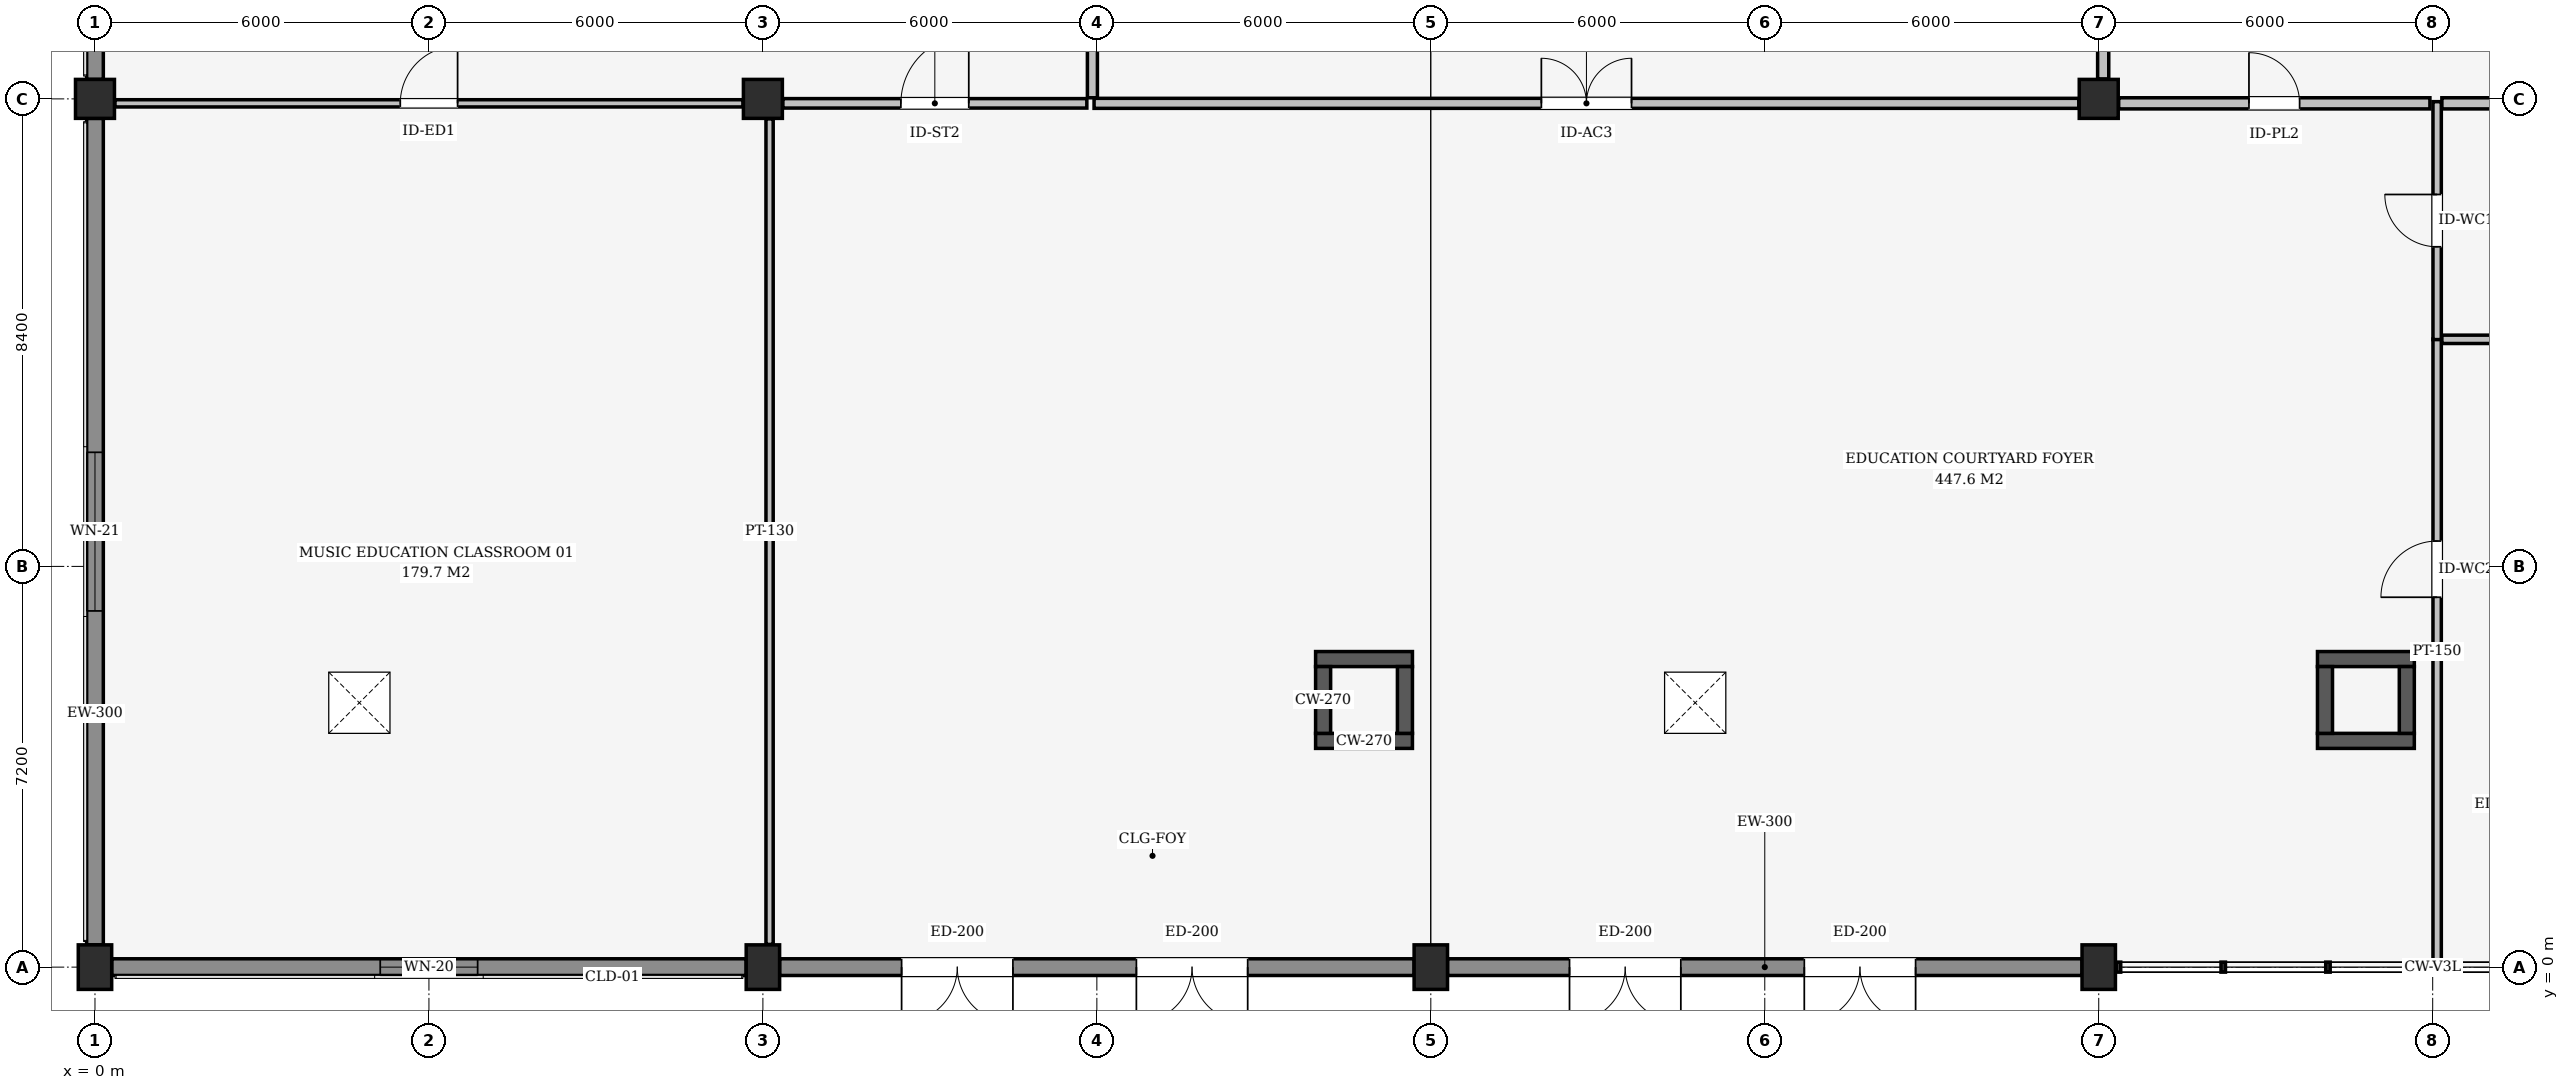
"""IFC4 building model, lengths in metres.
Left out: names, types, materials, properties, quantities, classifications, styles, units other than length and angle.
Written with IfcOpenShell. Run it as: python <this file> out.ifc"""

import sys

from ifc_helpers import new_model, si_unit, direction, frame, frame_2d, origin, origin_2d, place, context, subcontext, project, spatial, rectangle, extrude, element, fill, save


model = new_model("IFC4")
c1 = context("Model", 3, precision=1e-05, world=origin(), true_north=direction((0.0, 1.0)))
c2 = subcontext(c1, "Body", "Model", "MODEL_VIEW")
j1 = project(units=[si_unit("LENGTHUNIT", "METRE"), si_unit("PLANEANGLEUNIT", "RADIAN")], contexts=[c1])
p1 = place(None, origin())
s1 = spatial("IfcSite", under=j1, at=p1, CompositionType="ELEMENT")
p2 = place(p1, origin())
s2 = spatial("IfcBuilding", under=s1, at=p2, CompositionType="ELEMENT")
p3 = place(p2, origin())
s3 = spatial("IfcBuildingStorey", under=s2, at=p3, CompositionType="ELEMENT", Elevation=0.0)
for number, where, z_axis, x_axis in (
    (1, (0.0, 0.0, 0.0), (0.0, 0.0, 1.0), (1.0, 0.0, 0.0)),
    (2, (12.0, 0.0, 0.0), (0.0, 0.0, 1.0), (1.0, 0.0, 0.0)),
    (3, (24.0, 0.0, 0.0), (0.0, 0.0, 1.0), (1.0, 0.0, 0.0)),
    (4, (36.0, 0.0, 0.0), (0.0, 0.0, 1.0), (1.0, 0.0, 0.0)),
):
    element("IfcColumn", number, at=place(p3, frame(where, z_axis=z_axis, x_axis=x_axis)), inside=s3, PredefinedType="COLUMN", context=c2, shape_type="SweptSolid", body=[
        extrude(rectangle(XDim=0.6, YDim=0.8, at=origin_2d()), origin(), (0.0, 0.0, 1.0), 4.8),
    ])
for number, where, z_axis, x_axis in (
    (5, (0.0, 15.6, 0.0), (0.0, 0.0, 1.0), (1.0, 0.0, 0.0)),
    (6, (12.0, 15.6, 0.0), (0.0, 0.0, 1.0), (1.0, 0.0, 0.0)),
    (7, (36.0, 15.6, 0.0), (0.0, 0.0, 1.0), (1.0, 0.0, 0.0)),
):
    element("IfcColumn", number, at=place(p3, frame(where, z_axis=z_axis, x_axis=x_axis)), inside=s3, PredefinedType="COLUMN", context=c2, shape_type="SweptSolid", body=[
        extrude(rectangle(XDim=0.7, YDim=0.7, at=origin_2d()), origin(), (0.0, 0.0, 1.0), 4.8),
    ])
p4 = place(p3, frame((11.7, 0.0, 0.0), z_axis=(0.0, 0.0, 1.0), x_axis=(-1.0, 0.0, 0.0)))
e8 = element("IfcWall", 8, at=p4, inside=s3, PredefinedType="SOLIDWALL", context=c2, shape_type="SweptSolid", body=[
    extrude(rectangle(XDim=11.4, YDim=0.3, at=frame_2d((5.7, 0.0))), origin(), (0.0, 0.0, 1.0), 3.64),
])
p5 = place(p4, frame((4.825, 0.0, 0.85)))
e9 = element("IfcOpeningElement", 9, at=p5, cuts=e8, PredefinedType="OPENING", context=c2, shape_type="SweptSolid", body=[
    extrude(rectangle(XDim=1.75, YDim=1.45, at=frame_2d((0.875, 0.725))), frame((0.0, 0.16, 0.0), z_axis=(0.0, -1.0, 0.0), x_axis=(1.0, 0.0, 0.0)), (0.0, 0.0, 1.0), 0.32),
])
p6 = place(p3, frame((23.7, 0.0, 0.0), z_axis=(0.0, 0.0, 1.0), x_axis=(-1.0, 0.0, 0.0)))
e10 = element("IfcWall", 10, at=p6, inside=s3, PredefinedType="SOLIDWALL", context=c2, shape_type="SweptSolid", body=[
    extrude(rectangle(XDim=11.4, YDim=0.3, at=frame_2d((5.7, 0.0))), origin(), (0.0, 0.0, 1.0), 3.64),
])
p7 = place(p6, frame((2.99, 0.0, 0.0)))
e11 = element("IfcOpeningElement", 11, at=p7, cuts=e10, PredefinedType="OPENING", context=c2, shape_type="SweptSolid", body=[
    extrude(rectangle(XDim=2.0, YDim=2.4, at=frame_2d((1.0, 1.2))), frame((0.0, 0.16, 0.0), z_axis=(0.0, -1.0, 0.0), x_axis=(1.0, 0.0, 0.0)), (0.0, 0.0, 1.0), 0.32),
])
p8 = place(p6, frame((7.208, 0.0, 0.0)))
e12 = element("IfcOpeningElement", 12, at=p8, cuts=e10, PredefinedType="OPENING", context=c2, shape_type="SweptSolid", body=[
    extrude(rectangle(XDim=2.0, YDim=2.4, at=frame_2d((1.0, 1.2))), frame((0.0, 0.16, 0.0), z_axis=(0.0, -1.0, 0.0), x_axis=(1.0, 0.0, 0.0)), (0.0, 0.0, 1.0), 0.32),
])
p9 = place(p3, frame((35.7, 0.0, 0.0), z_axis=(0.0, 0.0, 1.0), x_axis=(-1.0, 0.0, 0.0)))
e13 = element("IfcWall", 13, at=p9, inside=s3, PredefinedType="SOLIDWALL", context=c2, shape_type="SweptSolid", body=[
    extrude(rectangle(XDim=11.4, YDim=0.3, at=frame_2d((5.7, 0.0))), origin(), (0.0, 0.0, 1.0), 3.64),
])
p10 = place(p9, frame((2.99, 0.0, 0.0)))
e14 = element("IfcOpeningElement", 14, at=p10, cuts=e13, PredefinedType="OPENING", context=c2, shape_type="SweptSolid", body=[
    extrude(rectangle(XDim=2.0, YDim=2.4, at=frame_2d((1.0, 1.2))), frame((0.0, 0.16, 0.0), z_axis=(0.0, -1.0, 0.0), x_axis=(1.0, 0.0, 0.0)), (0.0, 0.0, 1.0), 0.32),
])
p11 = place(p9, frame((7.208, 0.0, 0.0)))
e15 = element("IfcOpeningElement", 15, at=p11, cuts=e13, PredefinedType="OPENING", context=c2, shape_type="SweptSolid", body=[
    extrude(rectangle(XDim=2.0, YDim=2.4, at=frame_2d((1.0, 1.2))), frame((0.0, 0.16, 0.0), z_axis=(0.0, -1.0, 0.0), x_axis=(1.0, 0.0, 0.0)), (0.0, 0.0, 1.0), 0.32),
])
p12 = place(p3, frame((0.0, 0.4, 0.0), z_axis=(0.0, 0.0, 1.0), x_axis=(0.0, 1.0, 0.0)))
e16 = element("IfcWall", 16, at=p12, inside=s3, PredefinedType="SOLIDWALL", context=c2, shape_type="SweptSolid", body=[
    extrude(rectangle(XDim=14.85, YDim=0.3, at=frame_2d((7.425, 0.0))), origin(), (0.0, 0.0, 1.0), 3.684),
])
p13 = place(p12, frame((6.0, 0.0, 0.6)))
e17 = element("IfcOpeningElement", 17, at=p13, cuts=e16, PredefinedType="OPENING", context=c2, shape_type="SweptSolid", body=[
    extrude(rectangle(XDim=2.85, YDim=2.0, at=frame_2d((1.425, 1.0))), frame((0.0, 0.16, 0.0), z_axis=(0.0, -1.0, 0.0), x_axis=(1.0, 0.0, 0.0)), (0.0, 0.0, 1.0), 0.32),
])
p14 = place(p3, frame((0.0, 15.95, 0.0), z_axis=(0.0, 0.0, 1.0), x_axis=(0.0, 1.0, 0.0)))
e18 = element("IfcWall", 18, at=p14, inside=s3, PredefinedType="SOLIDWALL", context=c2, shape_type="SweptSolid", body=[
    extrude(rectangle(XDim=13.7, YDim=0.3, at=frame_2d((6.85, 0.0))), origin(), (0.0, 0.0, 1.0), 3.919),
])
p15 = place(p14, frame((8.614, 0.0, 0.85)))
e19 = element("IfcOpeningElement", 19, at=p15, cuts=e18, PredefinedType="OPENING", context=c2, shape_type="SweptSolid", body=[
    extrude(rectangle(XDim=2.5, YDim=1.9, at=frame_2d((1.25, 0.95))), frame((0.0, 0.16, 0.0), z_axis=(0.0, -1.0, 0.0), x_axis=(1.0, 0.0, 0.0)), (0.0, 0.0, 1.0), 0.32),
])
for number, where, z_axis, x_axis in (
    (20, (21.93, 4.065, 0.0), (0.0, 0.0, 1.0), (1.0, 0.0, 0.0)),
    (21, (21.93, 5.535, 0.0), (0.0, 0.0, 1.0), (1.0, 0.0, 0.0)),
):
    element("IfcWall", number, at=place(p3, frame(where, z_axis=z_axis, x_axis=x_axis)), inside=s3, PredefinedType="SHEAR", context=c2, shape_type="SweptSolid", body=[
        extrude(rectangle(XDim=1.74, YDim=0.27, at=frame_2d((0.87, 0.0))), origin(), (0.0, 0.0, 1.0), 4.55),
    ])
for number, where, z_axis, x_axis in (
    (22, (22.065, 4.2, 0.0), (0.0, 0.0, 1.0), (0.0, 1.0, 0.0)),
    (23, (23.535, 4.2, 0.0), (0.0, 0.0, 1.0), (0.0, 1.0, 0.0)),
):
    element("IfcWall", number, at=place(p3, frame(where, z_axis=z_axis, x_axis=x_axis)), inside=s3, PredefinedType="SHEAR", context=c2, shape_type="SweptSolid", body=[
        extrude(rectangle(XDim=1.2, YDim=0.27, at=frame_2d((0.6, 0.0))), origin(), (0.0, 0.0, 1.0), 4.55),
    ])
for number, where, z_axis, x_axis in (
    (24, (39.93, 4.065, 0.0), (0.0, 0.0, 1.0), (1.0, 0.0, 0.0)),
    (25, (39.93, 5.535, 0.0), (0.0, 0.0, 1.0), (1.0, 0.0, 0.0)),
):
    element("IfcWall", number, at=place(p3, frame(where, z_axis=z_axis, x_axis=x_axis)), inside=s3, PredefinedType="SHEAR", context=c2, shape_type="SweptSolid", body=[
        extrude(rectangle(XDim=1.74, YDim=0.27, at=frame_2d((0.87, 0.0))), origin(), (0.0, 0.0, 1.0), 4.55),
    ])
for number, where, z_axis, x_axis in (
    (26, (40.065, 4.2, 0.0), (0.0, 0.0, 1.0), (0.0, 1.0, 0.0)),
    (27, (41.535, 4.2, 0.0), (0.0, 0.0, 1.0), (0.0, 1.0, 0.0)),
):
    element("IfcWall", number, at=place(p3, frame(where, z_axis=z_axis, x_axis=x_axis)), inside=s3, PredefinedType="SHEAR", context=c2, shape_type="SweptSolid", body=[
        extrude(rectangle(XDim=1.2, YDim=0.27, at=frame_2d((0.6, 0.0))), origin(), (0.0, 0.0, 1.0), 4.55),
    ])
p16 = place(p3, frame((17.95, 15.52, 0.0), z_axis=(0.0, 0.0, 1.0), x_axis=(1.0, 0.0, 0.0)))
e28 = element("IfcWall", 28, at=p16, inside=s3, PredefinedType="PARTITIONING", context=c2, shape_type="SweptSolid", body=[
    extrude(rectangle(XDim=17.692, YDim=0.18, at=frame_2d((8.846, 0.0))), origin(), (0.0, 0.0, 1.0), 3.23),
])
p17 = place(p16, frame((8.036, 0.0, 0.0)))
e29 = element("IfcOpeningElement", 29, at=p17, cuts=e28, PredefinedType="OPENING", context=c2, shape_type="SweptSolid", body=[
    extrude(rectangle(XDim=1.62, YDim=2.28, at=frame_2d((0.81, 1.14))), frame((0.0, 0.1, 0.0), z_axis=(0.0, -1.0, 0.0), x_axis=(1.0, 0.0, 0.0)), (0.0, 0.0, 1.0), 0.2),
])
p18 = place(p3, frame((17.92, 15.62, 0.0), z_axis=(0.0, 0.0, 1.0), x_axis=(0.0, 1.0, 0.0)))
e30 = element("IfcWall", 30, at=p18, inside=s3, PredefinedType="PARTITIONING", context=c2, shape_type="SweptSolid", body=[
    extrude(rectangle(XDim=14.465, YDim=0.18, at=frame_2d((7.232, 0.0))), origin(), (0.0, 0.0, 1.0), 4.068),
])
p19 = place(p18, frame((6.423, 0.0, 0.0)))
e31 = element("IfcOpeningElement", 31, at=p19, cuts=e30, PredefinedType="OPENING", context=c2, shape_type="SweptSolid", body=[
    extrude(rectangle(XDim=1.62, YDim=2.28, at=frame_2d((0.81, 1.14))), frame((0.0, 0.1, 0.0), z_axis=(0.0, -1.0, 0.0), x_axis=(1.0, 0.0, 0.0)), (0.0, 0.0, 1.0), 0.2),
])
p20 = place(p3, frame((36.08, 15.958, 0.0), z_axis=(0.0, 0.0, 1.0), x_axis=(0.0, 1.0, 0.0)))
e32 = element("IfcWall", 32, at=p20, inside=s3, PredefinedType="PARTITIONING", context=c2, shape_type="SweptSolid", body=[
    extrude(rectangle(XDim=13.684, YDim=0.2, at=frame_2d((6.842, 0.0))), origin(), (0.0, 0.0, 1.0), 3.919),
])
p21 = place(p3, frame((12.358, 15.52, 0.0), z_axis=(0.0, 0.0, 1.0), x_axis=(1.0, 0.0, 0.0)))
e33 = element("IfcWall", 33, at=p21, inside=s3, PredefinedType="PARTITIONING", context=c2, shape_type="SweptSolid", body=[
    extrude(rectangle(XDim=5.462, YDim=0.17, at=frame_2d((2.731, 0.0))), origin(), (0.0, 0.0, 1.0), 3.23),
])
p22 = place(p21, frame((2.121, 0.0, 0.0)))
e34 = element("IfcOpeningElement", 34, at=p22, cuts=e33, PredefinedType="OPENING", context=c2, shape_type="SweptSolid", body=[
    extrude(rectangle(XDim=1.22, YDim=2.18, at=frame_2d((0.61, 1.09))), frame((0.0, 0.095, 0.0), z_axis=(0.0, -1.0, 0.0), x_axis=(1.0, 0.0, 0.0)), (0.0, 0.0, 1.0), 0.19),
])
p23 = place(p3, frame((12.12, 0.408, 0.0), z_axis=(0.0, 0.0, 1.0), x_axis=(0.0, 1.0, 0.0)))
e35 = element("IfcWall", 35, at=p23, inside=s3, PredefinedType="PARTITIONING", context=c2, shape_type="SweptSolid", body=[
    extrude(rectangle(XDim=14.834, YDim=0.13, at=frame_2d((7.417, 0.0))), origin(), (0.0, 0.0, 1.0), 3.684),
])
p24 = place(p3, frame((42.08, 0.05, 0.0), z_axis=(0.0, 0.0, 1.0), x_axis=(0.0, 1.0, 0.0)))
e36 = element("IfcWall", 36, at=p24, inside=s3, PredefinedType="PARTITIONING", context=c2, shape_type="SweptSolid", body=[
    extrude(rectangle(XDim=11.235, YDim=0.15, at=frame_2d((5.617, 0.0))), origin(), (0.0, 0.0, 1.0), 3.986),
])
p25 = place(p24, frame((6.596, 0.0, 0.0)))
e37 = element("IfcOpeningElement", 37, at=p25, cuts=e36, PredefinedType="OPENING", context=c2, shape_type="SweptSolid", body=[
    extrude(rectangle(XDim=1.01, YDim=2.1, at=frame_2d((0.505, 1.05))), frame((0.0, 0.085, 0.0), z_axis=(0.0, -1.0, 0.0), x_axis=(1.0, 0.0, 0.0)), (0.0, 0.0, 1.0), 0.17),
])
p26 = place(p3, frame((42.08, 11.275, 0.0), z_axis=(0.0, 0.0, 1.0), x_axis=(0.0, 1.0, 0.0)))
e38 = element("IfcWall", 38, at=p26, inside=s3, PredefinedType="PARTITIONING", context=c2, shape_type="SweptSolid", body=[
    extrude(rectangle(XDim=4.275, YDim=0.15, at=frame_2d((2.138, 0.0))), origin(), (0.0, 0.0, 1.0), 3.986),
])
p27 = place(p26, frame((1.667, 0.0, 0.0)))
e39 = element("IfcOpeningElement", 39, at=p27, cuts=e38, PredefinedType="OPENING", context=c2, shape_type="SweptSolid", body=[
    extrude(rectangle(XDim=0.94, YDim=2.1, at=frame_2d((0.47, 1.05))), frame((0.0, 0.085, 0.0), z_axis=(0.0, -1.0, 0.0), x_axis=(1.0, 0.0, 0.0)), (0.0, 0.0, 1.0), 0.17),
])
p28 = place(p3, frame((36.358, 15.52, 0.0), z_axis=(0.0, 0.0, 1.0), x_axis=(1.0, 0.0, 0.0)))
e40 = element("IfcWall", 40, at=p28, inside=s3, PredefinedType="PARTITIONING", context=c2, shape_type="SweptSolid", body=[
    extrude(rectangle(XDim=5.592, YDim=0.2, at=frame_2d((2.796, 0.0))), origin(), (0.0, 0.0, 1.0), 3.73),
])
p29 = place(p28, frame((2.341, 0.0, 0.0)))
e41 = element("IfcOpeningElement", 41, at=p29, cuts=e40, PredefinedType="OPENING", context=c2, shape_type="SweptSolid", body=[
    extrude(rectangle(XDim=0.91, YDim=2.1, at=frame_2d((0.455, 1.05))), frame((0.0, 0.11, 0.0), z_axis=(0.0, -1.0, 0.0), x_axis=(1.0, 0.0, 0.0)), (0.0, 0.0, 1.0), 0.22),
])
p30 = place(p3, frame((0.358, 15.52, 0.0), z_axis=(0.0, 0.0, 1.0), x_axis=(1.0, 0.0, 0.0)))
e42 = element("IfcWall", 42, at=p30, inside=s3, PredefinedType="PARTITIONING", context=c2, shape_type="SweptSolid", body=[
    extrude(rectangle(XDim=11.284, YDim=0.13, at=frame_2d((5.642, 0.0))), origin(), (0.0, 0.0, 1.0), 3.73),
])
p31 = place(p30, frame((5.127, 0.0, 0.0)))
e43 = element("IfcOpeningElement", 43, at=p31, cuts=e42, PredefinedType="OPENING", context=c2, shape_type="SweptSolid", body=[
    extrude(rectangle(XDim=1.03, YDim=2.18, at=frame_2d((0.515, 1.09))), frame((0.0, 0.075, 0.0), z_axis=(0.0, -1.0, 0.0), x_axis=(1.0, 0.0, 0.0)), (0.0, 0.0, 1.0), 0.15),
])
p32 = place(p3, frame((42.165, 11.28, 0.0), z_axis=(0.0, 0.0, 1.0), x_axis=(1.0, 0.0, 0.0)))
e44 = element("IfcWall", 44, at=p32, inside=s3, PredefinedType="PARTITIONING", context=c2, shape_type="SweptSolid", body=[
    extrude(rectangle(XDim=5.785, YDim=0.15, at=frame_2d((2.893, 0.0))), origin(), (0.0, 0.0, 1.0), 4.53),
])
p33 = place(p3, frame((42.165, 15.52, 0.0), z_axis=(0.0, 0.0, 1.0), x_axis=(1.0, 0.0, 0.0)))
e45 = element("IfcWall", 45, at=p33, inside=s3, PredefinedType="PARTITIONING", context=c2, shape_type="SweptSolid", body=[
    extrude(rectangle(XDim=5.477, YDim=0.2, at=frame_2d((2.739, 0.0))), origin(), (0.0, 0.0, 1.0), 3.73),
])
p34 = place(p5, origin())
e46 = element("IfcWindow", 46, at=p34, inside=s3, PartitioningType="SINGLE_PANEL", PredefinedType="WINDOW", context=c2, shape_type="SweptSolid", body=[
    extrude(rectangle(XDim=1.75, YDim=1.45, at=frame_2d((0.875, 0.725))), frame((0.0, 0.03, 0.0), z_axis=(0.0, -1.0, 0.0), x_axis=(1.0, 0.0, 0.0)), (0.0, 0.0, 1.0), 0.06),
])
fill(e9, e46)
p35 = place(p7, origin())
e47 = element("IfcDoor", 47, at=p35, inside=s3, OperationType="DOUBLE_DOOR_SINGLE_SWING", PredefinedType="DOOR", context=c2, shape_type="SweptSolid", body=[
    extrude(rectangle(XDim=2.0, YDim=2.4, at=frame_2d((1.0, 1.2))), frame((0.0, 0.025, 0.0), z_axis=(0.0, -1.0, 0.0), x_axis=(1.0, 0.0, 0.0)), (0.0, 0.0, 1.0), 0.05),
])
fill(e11, e47)
p36 = place(p8, origin())
e48 = element("IfcDoor", 48, at=p36, inside=s3, OperationType="DOUBLE_DOOR_SINGLE_SWING", PredefinedType="DOOR", context=c2, shape_type="SweptSolid", body=[
    extrude(rectangle(XDim=2.0, YDim=2.4, at=frame_2d((1.0, 1.2))), frame((0.0, 0.025, 0.0), z_axis=(0.0, -1.0, 0.0), x_axis=(1.0, 0.0, 0.0)), (0.0, 0.0, 1.0), 0.05),
])
fill(e12, e48)
p37 = place(p10, origin())
e49 = element("IfcDoor", 49, at=p37, inside=s3, OperationType="DOUBLE_DOOR_SINGLE_SWING", PredefinedType="DOOR", context=c2, shape_type="SweptSolid", body=[
    extrude(rectangle(XDim=2.0, YDim=2.4, at=frame_2d((1.0, 1.2))), frame((0.0, 0.025, 0.0), z_axis=(0.0, -1.0, 0.0), x_axis=(1.0, 0.0, 0.0)), (0.0, 0.0, 1.0), 0.05),
])
fill(e14, e49)
p38 = place(p11, origin())
e50 = element("IfcDoor", 50, at=p38, inside=s3, OperationType="DOUBLE_DOOR_SINGLE_SWING", PredefinedType="DOOR", context=c2, shape_type="SweptSolid", body=[
    extrude(rectangle(XDim=2.0, YDim=2.4, at=frame_2d((1.0, 1.2))), frame((0.0, 0.025, 0.0), z_axis=(0.0, -1.0, 0.0), x_axis=(1.0, 0.0, 0.0)), (0.0, 0.0, 1.0), 0.05),
])
fill(e15, e50)
p39 = place(p13, origin())
e51 = element("IfcWindow", 51, at=p39, inside=s3, PartitioningType="SINGLE_PANEL", PredefinedType="WINDOW", context=c2, shape_type="SweptSolid", body=[
    extrude(rectangle(XDim=2.85, YDim=2.0, at=frame_2d((1.425, 1.0))), frame((0.0, 0.03, 0.0), z_axis=(0.0, -1.0, 0.0), x_axis=(1.0, 0.0, 0.0)), (0.0, 0.0, 1.0), 0.06),
])
fill(e17, e51)
p40 = place(p17, origin())
e52 = element("IfcDoor", 52, at=p40, inside=s3, OperationType="DOUBLE_DOOR_SINGLE_SWING", PredefinedType="DOOR", context=c2, shape_type="SweptSolid", body=[
    extrude(rectangle(XDim=1.62, YDim=2.28, at=frame_2d((0.81, 1.14))), frame((0.0, 0.025, 0.0), z_axis=(0.0, -1.0, 0.0), x_axis=(1.0, 0.0, 0.0)), (0.0, 0.0, 1.0), 0.05),
])
fill(e29, e52)
p41 = place(p22, origin())
e53 = element("IfcDoor", 53, at=p41, inside=s3, OperationType="SINGLE_SWING_RIGHT", PredefinedType="DOOR", context=c2, shape_type="SweptSolid", body=[
    extrude(rectangle(XDim=1.22, YDim=2.18, at=frame_2d((0.61, 1.09))), frame((0.0, 0.025, 0.0), z_axis=(0.0, -1.0, 0.0), x_axis=(1.0, 0.0, 0.0)), (0.0, 0.0, 1.0), 0.05),
])
fill(e34, e53)
p42 = place(p25, origin())
e54 = element("IfcDoor", 54, at=p42, inside=s3, OperationType="SINGLE_SWING_LEFT", PredefinedType="DOOR", context=c2, shape_type="SweptSolid", body=[
    extrude(rectangle(XDim=1.01, YDim=2.1, at=frame_2d((0.505, 1.05))), frame((0.0, 0.025, 0.0), z_axis=(0.0, -1.0, 0.0), x_axis=(1.0, 0.0, 0.0)), (0.0, 0.0, 1.0), 0.05),
])
fill(e37, e54)
p43 = place(p27, origin())
e55 = element("IfcDoor", 55, at=p43, inside=s3, OperationType="SINGLE_SWING_RIGHT", PredefinedType="DOOR", context=c2, shape_type="SweptSolid", body=[
    extrude(rectangle(XDim=0.94, YDim=2.1, at=frame_2d((0.47, 1.05))), frame((0.0, 0.025, 0.0), z_axis=(0.0, -1.0, 0.0), x_axis=(1.0, 0.0, 0.0)), (0.0, 0.0, 1.0), 0.05),
])
fill(e39, e55)
p44 = place(p29, origin())
e56 = element("IfcDoor", 56, at=p44, inside=s3, OperationType="SINGLE_SWING_LEFT", PredefinedType="DOOR", context=c2, shape_type="SweptSolid", body=[
    extrude(rectangle(XDim=0.91, YDim=2.1, at=frame_2d((0.455, 1.05))), frame((0.0, 0.025, 0.0), z_axis=(0.0, -1.0, 0.0), x_axis=(1.0, 0.0, 0.0)), (0.0, 0.0, 1.0), 0.05),
])
fill(e41, e56)
p45 = place(p31, origin())
e57 = element("IfcDoor", 57, at=p45, inside=s3, OperationType="SINGLE_SWING_RIGHT", PredefinedType="DOOR", context=c2, shape_type="SweptSolid", body=[
    extrude(rectangle(XDim=1.03, YDim=2.18, at=frame_2d((0.515, 1.09))), frame((0.0, 0.025, 0.0), z_axis=(0.0, -1.0, 0.0), x_axis=(1.0, 0.0, 0.0)), (0.0, 0.0, 1.0), 0.05),
])
fill(e43, e57)
save(model, sys.argv[1])
